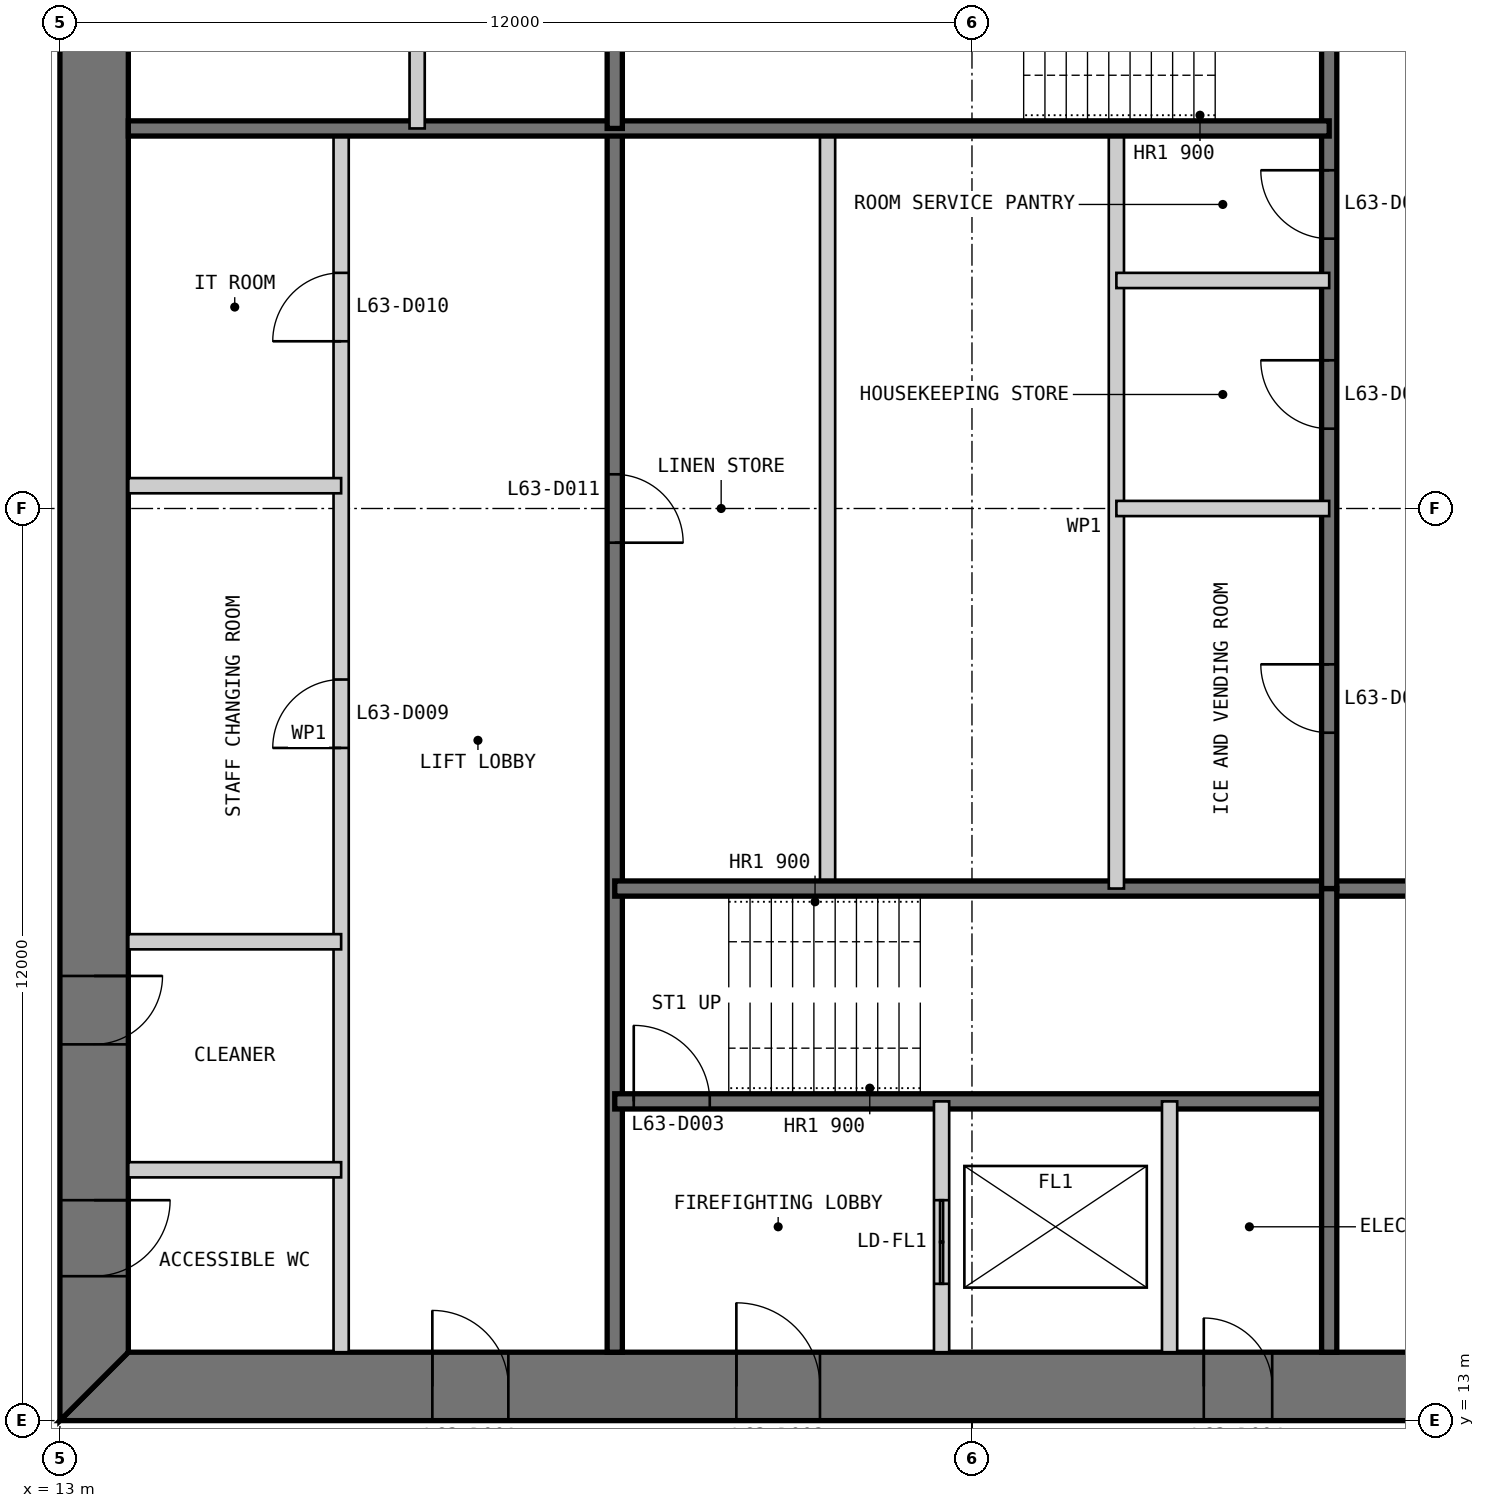
"""IFC4 building model, lengths in metres.
Left out: names, types, materials, properties, quantities, classifications, styles, units other than length and angle.
Written with IfcOpenShell. Run it as: python <this file> out.ifc"""

import sys

from ifc_helpers import new_model, si_unit, direction, frame, frame_2d, origin, place, context, subcontext, project, spatial, polyline, rectangle, outline, extrude, element, fill, save


model = new_model("IFC4")
c1 = context("Model", 3, precision=1e-05, world=origin(), true_north=direction((0.0, 1.0)))
c2 = subcontext(c1, "Body", "Model", "MODEL_VIEW")
j1 = project(units=[si_unit("LENGTHUNIT", "METRE"), si_unit("PLANEANGLEUNIT", "RADIAN")], contexts=[c1])
p1 = place(None, origin())
s1 = spatial("IfcSite", under=j1, at=p1, CompositionType="ELEMENT")
p2 = place(p1, origin())
s2 = spatial("IfcBuilding", under=s1, at=p2, CompositionType="ELEMENT")
p3 = place(p2, frame((0.0, 0.0, 266.2)))
s3 = spatial("IfcBuildingStorey", under=s2, at=p3, CompositionType="ELEMENT", Elevation=266.2)
p4 = place(p3, frame((13.0, 13.45, 0.0), z_axis=(0.0, 0.0, 1.0), x_axis=(1.0, 0.0, 0.0)))
e1 = element("IfcWall", 1, at=p4, inside=s3, PredefinedType="SHEAR", context=c2, shape_type="SweptSolid", body=[
    extrude(outline(polyline([(0.0, -0.45), (24.0, -0.45), (23.1, 0.45), (0.9, 0.45), (0.0, -0.45)])), origin(), (0.0, 0.0, 1.0), 3.4),
])
p5 = place(p4, frame((4.9, 0.0, 0.0)))
e2 = element("IfcOpeningElement", 2, at=p5, cuts=e1, PredefinedType="OPENING", context=c2, shape_type="SweptSolid", body=[
    extrude(rectangle(XDim=1.0, YDim=2.2, at=frame_2d((0.5, 1.1))), frame((0.0, 0.46, 0.0), z_axis=(0.0, -1.0, 0.0), x_axis=(1.0, 0.0, 0.0)), (0.0, 0.0, 1.0), 0.92),
])
p6 = place(p4, frame((8.9, 0.0, 0.0)))
e3 = element("IfcOpeningElement", 3, at=p6, cuts=e1, PredefinedType="OPENING", context=c2, shape_type="SweptSolid", body=[
    extrude(rectangle(XDim=1.1, YDim=2.2, at=frame_2d((0.55, 1.1))), frame((0.0, 0.46, 0.0), z_axis=(0.0, -1.0, 0.0), x_axis=(1.0, 0.0, 0.0)), (0.0, 0.0, 1.0), 0.92),
])
p7 = place(p4, frame((15.05, 0.0, 0.0)))
e4 = element("IfcOpeningElement", 4, at=p7, cuts=e1, PredefinedType="OPENING", context=c2, shape_type="SweptSolid", body=[
    extrude(rectangle(XDim=0.9, YDim=2.2, at=frame_2d((0.45, 1.1))), frame((0.0, 0.46, 0.0), z_axis=(0.0, -1.0, 0.0), x_axis=(1.0, 0.0, 0.0)), (0.0, 0.0, 1.0), 0.92),
])
p8 = place(p4, frame((17.9, 0.0, 0.0)))
e5 = element("IfcOpeningElement", 5, at=p8, cuts=e1, PredefinedType="OPENING", context=c2, shape_type="SweptSolid", body=[
    extrude(rectangle(XDim=1.0, YDim=2.2, at=frame_2d((0.5, 1.1))), frame((0.0, 0.46, 0.0), z_axis=(0.0, -1.0, 0.0), x_axis=(1.0, 0.0, 0.0)), (0.0, 0.0, 1.0), 0.92),
])
p9 = place(p4, frame((21.4, 0.0, 0.0)))
e6 = element("IfcOpeningElement", 6, at=p9, cuts=e1, PredefinedType="OPENING", context=c2, shape_type="SweptSolid", body=[
    extrude(rectangle(XDim=1.0, YDim=2.2, at=frame_2d((0.5, 1.1))), frame((0.0, 0.46, 0.0), z_axis=(0.0, -1.0, 0.0), x_axis=(1.0, 0.0, 0.0)), (0.0, 0.0, 1.0), 0.92),
])
p10 = place(p3, frame((13.45, 36.1, 0.0), z_axis=(0.0, 0.0, 1.0), x_axis=(0.0, -1.0, 0.0)))
e7 = element("IfcWall", 7, at=p10, inside=s3, PredefinedType="SHEAR", context=c2, shape_type="SweptSolid", body=[
    extrude(outline(polyline([(-0.9, -0.45), (23.1, -0.45), (22.2, 0.45), (0.0, 0.45), (-0.9, -0.45)])), origin(), (0.0, 0.0, 1.0), 3.4),
])
p11 = place(p10, frame((20.2, 0.0, 0.0)))
e8 = element("IfcOpeningElement", 8, at=p11, cuts=e7, PredefinedType="OPENING", context=c2, shape_type="SweptSolid", body=[
    extrude(rectangle(XDim=1.0, YDim=2.2, at=frame_2d((0.5, 1.1))), frame((0.0, 0.46, 0.0), z_axis=(0.0, -1.0, 0.0), x_axis=(1.0, 0.0, 0.0)), (0.0, 0.0, 1.0), 0.92),
])
p12 = place(p10, frame((17.25, 0.0, 0.0)))
e9 = element("IfcOpeningElement", 9, at=p12, cuts=e7, PredefinedType="OPENING", context=c2, shape_type="SweptSolid", body=[
    extrude(rectangle(XDim=0.9, YDim=2.2, at=frame_2d((0.45, 1.1))), frame((0.0, 0.46, 0.0), z_axis=(0.0, -1.0, 0.0), x_axis=(1.0, 0.0, 0.0)), (0.0, 0.0, 1.0), 0.92),
])
p13 = place(p3, frame((16.7, 13.9, 0.0), z_axis=(0.0, 0.0, 1.0), x_axis=(0.0, 1.0, 0.0)))
e10 = element("IfcWall", 10, at=p13, inside=s3, PredefinedType="PARTITIONING", context=c2, shape_type="SweptSolid", body=[
    extrude(rectangle(XDim=16.1, YDim=0.2, at=frame_2d((8.05, 0.0))), origin(), (0.0, 0.0, 1.0), 3.2),
])
p14 = place(p13, frame((7.95, 0.0, 0.0)))
e11 = element("IfcOpeningElement", 11, at=p14, cuts=e10, PredefinedType="OPENING", context=c2, shape_type="SweptSolid", body=[
    extrude(rectangle(XDim=0.9, YDim=2.2, at=frame_2d((0.45, 1.1))), frame((0.0, 0.11, 0.0), z_axis=(0.0, -1.0, 0.0), x_axis=(1.0, 0.0, 0.0)), (0.0, 0.0, 1.0), 0.22),
])
p15 = place(p13, frame((13.3, 0.0, 0.0)))
e12 = element("IfcOpeningElement", 12, at=p15, cuts=e10, PredefinedType="OPENING", context=c2, shape_type="SweptSolid", body=[
    extrude(rectangle(XDim=0.9, YDim=2.2, at=frame_2d((0.45, 1.1))), frame((0.0, 0.11, 0.0), z_axis=(0.0, -1.0, 0.0), x_axis=(1.0, 0.0, 0.0)), (0.0, 0.0, 1.0), 0.22),
])
p16 = place(p3, frame((20.3, 13.9, 0.0), z_axis=(0.0, 0.0, 1.0), x_axis=(0.0, 1.0, 0.0)))
e13 = element("IfcWall", 13, at=p16, inside=s3, PredefinedType="SOLIDWALL", context=c2, shape_type="SweptSolid", body=[
    extrude(rectangle(XDim=16.1, YDim=0.2, at=frame_2d((8.05, 0.0))), origin(), (0.0, 0.0, 1.0), 3.2),
])
p17 = place(p16, frame((10.65, 0.0, 0.0)))
e14 = element("IfcOpeningElement", 14, at=p17, cuts=e13, PredefinedType="OPENING", context=c2, shape_type="SweptSolid", body=[
    extrude(rectangle(XDim=0.9, YDim=2.2, at=frame_2d((0.45, 1.1))), frame((0.0, 0.11, 0.0), z_axis=(0.0, -1.0, 0.0), x_axis=(1.0, 0.0, 0.0)), (0.0, 0.0, 1.0), 0.22),
])
p18 = place(p3, frame((23.1, 20.0, 0.0), z_axis=(0.0, 0.0, 1.0), x_axis=(0.0, 1.0, 0.0)))
e15 = element("IfcWall", 15, at=p18, inside=s3, PredefinedType="PARTITIONING", context=c2, shape_type="SweptSolid", body=[
    extrude(rectangle(XDim=10.0, YDim=0.2, at=frame_2d((5.0, 0.0))), origin(), (0.0, 0.0, 1.0), 3.2),
])
p19 = place(p3, frame((20.3, 17.2, 0.0), z_axis=(0.0, 0.0, 1.0), x_axis=(1.0, 0.0, 0.0)))
e16 = element("IfcWall", 16, at=p19, inside=s3, PredefinedType="SOLIDWALL", context=c2, shape_type="SweptSolid", body=[
    extrude(rectangle(XDim=9.4, YDim=0.2, at=frame_2d((4.7, 0.0))), origin(), (0.0, 0.0, 1.0), 3.2),
])
p20 = place(p19, frame((0.25, 0.0, 0.0)))
e17 = element("IfcOpeningElement", 17, at=p20, cuts=e16, PredefinedType="OPENING", context=c2, shape_type="SweptSolid", body=[
    extrude(rectangle(XDim=1.0, YDim=2.2, at=frame_2d((0.5, 1.1))), frame((0.0, 0.11, 0.0), z_axis=(0.0, -1.0, 0.0), x_axis=(1.0, 0.0, 0.0)), (0.0, 0.0, 1.0), 0.22),
])
p21 = place(p3, frame((20.3, 20.0, 0.0), z_axis=(0.0, 0.0, 1.0), x_axis=(1.0, 0.0, 0.0)))
e18 = element("IfcWall", 18, at=p21, inside=s3, PredefinedType="SOLIDWALL", context=c2, shape_type="SweptSolid", body=[
    extrude(rectangle(XDim=15.8, YDim=0.2, at=frame_2d((7.9, 0.0))), origin(), (0.0, 0.0, 1.0), 3.2),
])
p22 = place(p3, frame((24.6, 13.9, 0.0), z_axis=(0.0, 0.0, 1.0), x_axis=(0.0, 1.0, 0.0)))
e19 = element("IfcWall", 19, at=p22, inside=s3, PredefinedType="PARTITIONING", context=c2, shape_type="SweptSolid", body=[
    extrude(rectangle(XDim=3.3, YDim=0.2, at=frame_2d((1.65, 0.0))), origin(), (0.0, 0.0, 1.0), 3.2),
])
p23 = place(p22, frame((0.9, 0.0, 0.0)))
e20 = element("IfcOpeningElement", 20, at=p23, cuts=e19, PredefinedType="OPENING", context=c2, shape_type="SweptSolid", body=[
    extrude(rectangle(XDim=1.1, YDim=2.2, at=frame_2d((0.55, 1.1))), frame((0.0, 0.11, 0.0), z_axis=(0.0, -1.0, 0.0), x_axis=(1.0, 0.0, 0.0)), (0.0, 0.0, 1.0), 0.22),
])
p24 = place(p3, frame((27.6, 13.9, 0.0), z_axis=(0.0, 0.0, 1.0), x_axis=(0.0, 1.0, 0.0)))
e21 = element("IfcWall", 21, at=p24, inside=s3, PredefinedType="PARTITIONING", context=c2, shape_type="SweptSolid", body=[
    extrude(rectangle(XDim=3.3, YDim=0.2, at=frame_2d((1.65, 0.0))), origin(), (0.0, 0.0, 1.0), 3.2),
])
p25 = place(p3, frame((29.7, 13.9, 0.0), z_axis=(0.0, 0.0, 1.0), x_axis=(0.0, 1.0, 0.0)))
e22 = element("IfcWall", 22, at=p25, inside=s3, PredefinedType="SOLIDWALL", context=c2, shape_type="SweptSolid", body=[
    extrude(rectangle(XDim=6.1, YDim=0.2, at=frame_2d((3.05, 0.0))), origin(), (0.0, 0.0, 1.0), 3.2),
])
for number, where, z_axis, x_axis in (
    (23, (13.9, 16.3, 0.0), (0.0, 0.0, 1.0), (1.0, 0.0, 0.0)),
    (24, (13.9, 19.3, 0.0), (0.0, 0.0, 1.0), (1.0, 0.0, 0.0)),
    (25, (13.9, 25.3, 0.0), (0.0, 0.0, 1.0), (1.0, 0.0, 0.0)),
):
    element("IfcWall", number, at=place(p3, frame(where, z_axis=z_axis, x_axis=x_axis)), inside=s3, PredefinedType="PARTITIONING", context=c2, shape_type="SweptSolid", body=[
        extrude(rectangle(XDim=2.8, YDim=0.2, at=frame_2d((1.4, 0.0))), origin(), (0.0, 0.0, 1.0), 3.2),
    ])
p26 = place(p3, frame((29.7, 36.1, 0.0), z_axis=(0.0, 0.0, 1.0), x_axis=(0.0, -1.0, 0.0)))
e26 = element("IfcWall", 26, at=p26, inside=s3, PredefinedType="SOLIDWALL", context=c2, shape_type="SweptSolid", body=[
    extrude(rectangle(XDim=16.1, YDim=0.2, at=frame_2d((8.05, 0.0))), origin(), (0.0, 0.0, 1.0), 3.2),
])
p27 = place(p26, frame((6.65, 0.0, 0.0)))
e27 = element("IfcOpeningElement", 27, at=p27, cuts=e26, PredefinedType="OPENING", context=c2, shape_type="SweptSolid", body=[
    extrude(rectangle(XDim=0.9, YDim=2.2, at=frame_2d((0.45, 1.1))), frame((0.0, 0.11, 0.0), z_axis=(0.0, -1.0, 0.0), x_axis=(1.0, 0.0, 0.0)), (0.0, 0.0, 1.0), 0.22),
])
p28 = place(p26, frame((9.15, 0.0, 0.0)))
e28 = element("IfcOpeningElement", 28, at=p28, cuts=e26, PredefinedType="OPENING", context=c2, shape_type="SweptSolid", body=[
    extrude(rectangle(XDim=0.9, YDim=2.2, at=frame_2d((0.45, 1.1))), frame((0.0, 0.11, 0.0), z_axis=(0.0, -1.0, 0.0), x_axis=(1.0, 0.0, 0.0)), (0.0, 0.0, 1.0), 0.22),
])
p29 = place(p26, frame((13.15, 0.0, 0.0)))
e29 = element("IfcOpeningElement", 29, at=p29, cuts=e26, PredefinedType="OPENING", context=c2, shape_type="SweptSolid", body=[
    extrude(rectangle(XDim=0.9, YDim=2.2, at=frame_2d((0.45, 1.1))), frame((0.0, 0.11, 0.0), z_axis=(0.0, -1.0, 0.0), x_axis=(1.0, 0.0, 0.0)), (0.0, 0.0, 1.0), 0.22),
])
p30 = place(p3, frame((26.9, 30.0, 0.0), z_axis=(0.0, 0.0, 1.0), x_axis=(0.0, -1.0, 0.0)))
e30 = element("IfcWall", 30, at=p30, inside=s3, PredefinedType="PARTITIONING", context=c2, shape_type="SweptSolid", body=[
    extrude(rectangle(XDim=10.0, YDim=0.2, at=frame_2d((5.0, 0.0))), origin(), (0.0, 0.0, 1.0), 3.2),
])
p31 = place(p3, frame((29.7, 30.0, 0.0), z_axis=(0.0, 0.0, 1.0), x_axis=(-1.0, 0.0, 0.0)))
e31 = element("IfcWall", 31, at=p31, inside=s3, PredefinedType="SOLIDWALL", context=c2, shape_type="SweptSolid", body=[
    extrude(rectangle(XDim=15.8, YDim=0.2, at=frame_2d((7.9, 0.0))), origin(), (0.0, 0.0, 1.0), 3.2),
])
p32 = place(p3, frame((20.3, 36.1, 0.0), z_axis=(0.0, 0.0, 1.0), x_axis=(0.0, -1.0, 0.0)))
e32 = element("IfcWall", 32, at=p32, inside=s3, PredefinedType="SOLIDWALL", context=c2, shape_type="SweptSolid", body=[
    extrude(rectangle(XDim=6.1, YDim=0.2, at=frame_2d((3.05, 0.0))), origin(), (0.0, 0.0, 1.0), 3.2),
])
p33 = place(p3, frame((17.7, 36.1, 0.0), z_axis=(0.0, 0.0, 1.0), x_axis=(0.0, -1.0, 0.0)))
e33 = element("IfcWall", 33, at=p33, inside=s3, PredefinedType="PARTITIONING", context=c2, shape_type="SweptSolid", body=[
    extrude(rectangle(XDim=6.1, YDim=0.2, at=frame_2d((3.05, 0.0))), origin(), (0.0, 0.0, 1.0), 3.2),
])
for number, where, z_axis, x_axis in (
    (34, (29.7, 28.0, 0.0), (0.0, 0.0, 1.0), (-1.0, 0.0, 0.0)),
    (35, (29.7, 25.0, 0.0), (0.0, 0.0, 1.0), (-1.0, 0.0, 0.0)),
):
    element("IfcWall", number, at=place(p3, frame(where, z_axis=z_axis, x_axis=x_axis)), inside=s3, PredefinedType="PARTITIONING", context=c2, shape_type="SweptSolid", body=[
        extrude(rectangle(XDim=2.8, YDim=0.2, at=frame_2d((1.4, 0.0))), origin(), (0.0, 0.0, 1.0), 3.2),
    ])
p34 = place(p5, origin())
e36 = element("IfcDoor", 36, at=p34, inside=s3, OperationType="SINGLE_SWING_LEFT", PredefinedType="DOOR", context=c2, shape_type="SweptSolid", body=[
    extrude(rectangle(XDim=1.0, YDim=2.2, at=frame_2d((0.5, 1.1))), frame((0.0, 0.025, 0.0), z_axis=(0.0, -1.0, 0.0), x_axis=(1.0, 0.0, 0.0)), (0.0, 0.0, 1.0), 0.05),
    extrude(outline(polyline([(0.0, 0.0), (0.04, 0.0), (0.04, 2.16), (0.96, 2.16), (0.96, 0.0), (1.0, 0.0), (1.0, 2.2), (0.0, 2.2), (0.0, 0.0)])), frame((0.0, 0.3, 0.0), z_axis=(0.0, -1.0, 0.0), x_axis=(1.0, 0.0, 0.0)), (0.0, 0.0, 1.0), 0.6),
])
fill(e2, e36)
p35 = place(p6, origin())
e37 = element("IfcDoor", 37, at=p35, inside=s3, OperationType="SINGLE_SWING_LEFT", PredefinedType="DOOR", context=c2, shape_type="SweptSolid", body=[
    extrude(rectangle(XDim=1.1, YDim=2.2, at=frame_2d((0.55, 1.1))), frame((0.0, 0.025, 0.0), z_axis=(0.0, -1.0, 0.0), x_axis=(1.0, 0.0, 0.0)), (0.0, 0.0, 1.0), 0.05),
    extrude(outline(polyline([(0.0, 0.0), (0.04, 0.0), (0.04, 2.16), (1.06, 2.16), (1.06, 0.0), (1.1, 0.0), (1.1, 2.2), (0.0, 2.2), (0.0, 0.0)])), frame((0.0, 0.3, 0.0), z_axis=(0.0, -1.0, 0.0), x_axis=(1.0, 0.0, 0.0)), (0.0, 0.0, 1.0), 0.6),
])
fill(e3, e37)
p36 = place(p20, origin())
e38 = element("IfcDoor", 38, at=p36, inside=s3, OperationType="SINGLE_SWING_LEFT", PredefinedType="DOOR", context=c2, shape_type="SweptSolid", body=[
    extrude(rectangle(XDim=1.0, YDim=2.2, at=frame_2d((0.5, 1.1))), frame((0.0, 0.025, 0.0), z_axis=(0.0, -1.0, 0.0), x_axis=(1.0, 0.0, 0.0)), (0.0, 0.0, 1.0), 0.05),
])
fill(e17, e38)
p37 = place(p7, origin())
e39 = element("IfcDoor", 39, at=p37, inside=s3, OperationType="SINGLE_SWING_LEFT", PredefinedType="DOOR", context=c2, shape_type="SweptSolid", body=[
    extrude(rectangle(XDim=0.9, YDim=2.2, at=frame_2d((0.45, 1.1))), frame((0.0, 0.025, 0.0), z_axis=(0.0, -1.0, 0.0), x_axis=(1.0, 0.0, 0.0)), (0.0, 0.0, 1.0), 0.05),
    extrude(outline(polyline([(0.0, 0.0), (0.04, 0.0), (0.04, 2.16), (0.86, 2.16), (0.86, 0.0), (0.9, 0.0), (0.9, 2.2), (0.0, 2.2), (0.0, 0.0)])), frame((0.0, 0.3, 0.0), z_axis=(0.0, -1.0, 0.0), x_axis=(1.0, 0.0, 0.0)), (0.0, 0.0, 1.0), 0.6),
])
fill(e4, e39)
p38 = place(p11, origin())
e40 = element("IfcDoor", 40, at=p38, inside=s3, OperationType="SINGLE_SWING_LEFT", PredefinedType="DOOR", context=c2, shape_type="SweptSolid", body=[
    extrude(rectangle(XDim=1.0, YDim=2.2, at=frame_2d((0.5, 1.1))), frame((0.0, 0.025, 0.0), z_axis=(0.0, -1.0, 0.0), x_axis=(1.0, 0.0, 0.0)), (0.0, 0.0, 1.0), 0.05),
    extrude(outline(polyline([(0.0, 0.0), (0.04, 0.0), (0.04, 2.16), (0.96, 2.16), (0.96, 0.0), (1.0, 0.0), (1.0, 2.2), (0.0, 2.2), (0.0, 0.0)])), frame((0.0, 0.3, 0.0), z_axis=(0.0, -1.0, 0.0), x_axis=(1.0, 0.0, 0.0)), (0.0, 0.0, 1.0), 0.6),
])
fill(e8, e40)
p39 = place(p12, origin())
e41 = element("IfcDoor", 41, at=p39, inside=s3, OperationType="SINGLE_SWING_LEFT", PredefinedType="DOOR", context=c2, shape_type="SweptSolid", body=[
    extrude(rectangle(XDim=0.9, YDim=2.2, at=frame_2d((0.45, 1.1))), frame((0.0, 0.025, 0.0), z_axis=(0.0, -1.0, 0.0), x_axis=(1.0, 0.0, 0.0)), (0.0, 0.0, 1.0), 0.05),
    extrude(outline(polyline([(0.0, 0.0), (0.04, 0.0), (0.04, 2.16), (0.86, 2.16), (0.86, 0.0), (0.9, 0.0), (0.9, 2.2), (0.0, 2.2), (0.0, 0.0)])), frame((0.0, 0.3, 0.0), z_axis=(0.0, -1.0, 0.0), x_axis=(1.0, 0.0, 0.0)), (0.0, 0.0, 1.0), 0.6),
])
fill(e9, e41)
p40 = place(p14, origin())
e42 = element("IfcDoor", 42, at=p40, inside=s3, OperationType="SINGLE_SWING_LEFT", PredefinedType="DOOR", context=c2, shape_type="SweptSolid", body=[
    extrude(rectangle(XDim=0.9, YDim=2.2, at=frame_2d((0.45, 1.1))), frame((0.0, 0.025, 0.0), z_axis=(0.0, -1.0, 0.0), x_axis=(1.0, 0.0, 0.0)), (0.0, 0.0, 1.0), 0.05),
])
fill(e11, e42)
p41 = place(p15, origin())
e43 = element("IfcDoor", 43, at=p41, inside=s3, OperationType="SINGLE_SWING_LEFT", PredefinedType="DOOR", context=c2, shape_type="SweptSolid", body=[
    extrude(rectangle(XDim=0.9, YDim=2.2, at=frame_2d((0.45, 1.1))), frame((0.0, 0.025, 0.0), z_axis=(0.0, -1.0, 0.0), x_axis=(1.0, 0.0, 0.0)), (0.0, 0.0, 1.0), 0.05),
])
fill(e12, e43)
p42 = place(p17, frame((0.9, 0.0, 0.0), z_axis=(0.0, 0.0, 1.0), x_axis=(-1.0, 0.0, 0.0)))
e44 = element("IfcDoor", 44, at=p42, inside=s3, OperationType="SINGLE_SWING_RIGHT", PredefinedType="DOOR", context=c2, shape_type="SweptSolid", body=[
    extrude(rectangle(XDim=0.9, YDim=2.2, at=frame_2d((0.45, 1.1))), frame((0.0, 0.025, 0.0), z_axis=(0.0, -1.0, 0.0), x_axis=(1.0, 0.0, 0.0)), (0.0, 0.0, 1.0), 0.05),
])
fill(e14, e44)
p43 = place(p27, frame((0.9, 0.0, 0.0), z_axis=(0.0, 0.0, 1.0), x_axis=(-1.0, 0.0, 0.0)))
e45 = element("IfcDoor", 45, at=p43, inside=s3, OperationType="SINGLE_SWING_RIGHT", PredefinedType="DOOR", context=c2, shape_type="SweptSolid", body=[
    extrude(rectangle(XDim=0.9, YDim=2.2, at=frame_2d((0.45, 1.1))), frame((0.0, 0.025, 0.0), z_axis=(0.0, -1.0, 0.0), x_axis=(1.0, 0.0, 0.0)), (0.0, 0.0, 1.0), 0.05),
])
fill(e27, e45)
p44 = place(p28, frame((0.9, 0.0, 0.0), z_axis=(0.0, 0.0, 1.0), x_axis=(-1.0, 0.0, 0.0)))
e46 = element("IfcDoor", 46, at=p44, inside=s3, OperationType="SINGLE_SWING_RIGHT", PredefinedType="DOOR", context=c2, shape_type="SweptSolid", body=[
    extrude(rectangle(XDim=0.9, YDim=2.2, at=frame_2d((0.45, 1.1))), frame((0.0, 0.025, 0.0), z_axis=(0.0, -1.0, 0.0), x_axis=(1.0, 0.0, 0.0)), (0.0, 0.0, 1.0), 0.05),
])
fill(e28, e46)
p45 = place(p29, frame((0.9, 0.0, 0.0), z_axis=(0.0, 0.0, 1.0), x_axis=(-1.0, 0.0, 0.0)))
e47 = element("IfcDoor", 47, at=p45, inside=s3, OperationType="SINGLE_SWING_RIGHT", PredefinedType="DOOR", context=c2, shape_type="SweptSolid", body=[
    extrude(rectangle(XDim=0.9, YDim=2.2, at=frame_2d((0.45, 1.1))), frame((0.0, 0.025, 0.0), z_axis=(0.0, -1.0, 0.0), x_axis=(1.0, 0.0, 0.0)), (0.0, 0.0, 1.0), 0.05),
])
fill(e29, e47)
p46 = place(p23, origin())
e48 = element("IfcDoor", 48, at=p46, inside=s3, OperationType="DOUBLE_DOOR_SLIDING", PredefinedType="DOOR", context=c2, shape_type="SweptSolid", body=[
    extrude(rectangle(XDim=1.1, YDim=2.2, at=frame_2d((0.55, 1.1))), frame((0.0, 0.025, 0.0), z_axis=(0.0, -1.0, 0.0), x_axis=(1.0, 0.0, 0.0)), (0.0, 0.0, 1.0), 0.05),
])
fill(e20, e48)
save(model, sys.argv[1])
